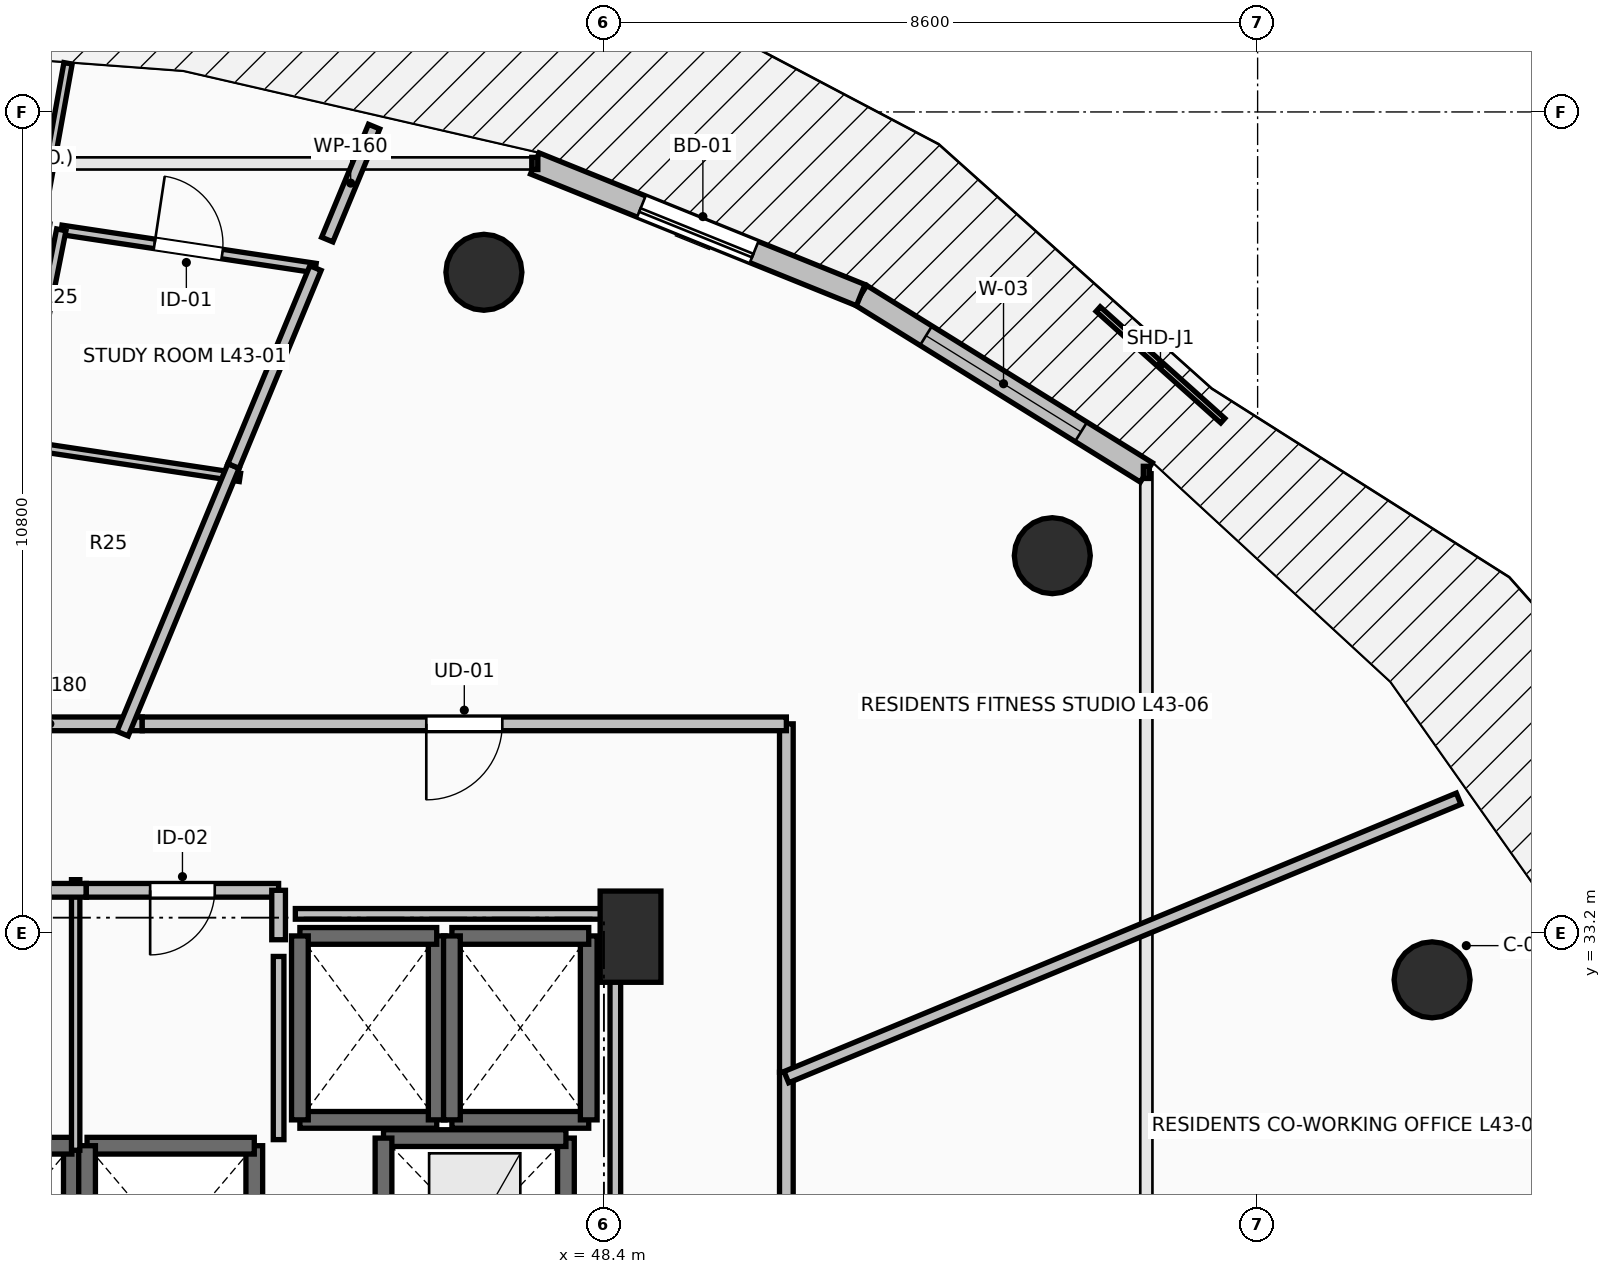
"""IFC4 building model, lengths in metres.
Left out: names, types, materials, properties, quantities, classifications, styles, units other than length and angle.
Written with IfcOpenShell. Run it as: python <this file> out.ifc"""

import sys

from ifc_helpers import new_model, si_unit, direction, frame, frame_2d, origin, origin_2d, place, context, subcontext, project, spatial, rectangle, circle, extrude, element, fill, save


model = new_model("IFC4")
c1 = context("Model", 3, precision=1e-05, world=origin(), true_north=direction((0.0, 1.0)))
c2 = subcontext(c1, "Body", "Model", "MODEL_VIEW")
j1 = project(units=[si_unit("LENGTHUNIT", "METRE"), si_unit("PLANEANGLEUNIT", "RADIAN")], contexts=[c1])
p1 = place(None, origin())
s1 = spatial("IfcSite", under=j1, at=p1, CompositionType="ELEMENT")
p2 = place(p1, origin())
s2 = spatial("IfcBuilding", under=s1, at=p2, CompositionType="ELEMENT")
p3 = place(p2, frame((0.0, 0.0, 160.6)))
s3 = spatial("IfcBuildingStorey", under=s2, at=p3, CompositionType="ELEMENT", Elevation=160.6)
for number, where, z_axis, x_axis in (
    (1, (59.295, 32.582, 0.0), (0.0, 0.0, 1.0), (0.924, 0.383, 0.0)),
    (2, (54.299, 38.162, 0.0), (0.0, 0.0, 1.0), (0.707, 0.707, 0.0)),
    (3, (46.821, 41.891, 0.0), (0.0, 0.0, 1.0), (0.383, 0.924, 0.0)),
):
    element("IfcColumn", number, at=place(p3, frame(where, z_axis=z_axis, x_axis=x_axis)), inside=s3, PredefinedType="COLUMN", context=c2, shape_type="SweptSolid", body=[
        extrude(circle(Radius=0.5, at=origin_2d()), origin(), (0.0, 0.0, 1.0), 3.5),
    ])
p4 = place(p3, frame((48.75, 33.15, 0.0), z_axis=(0.0, 0.0, 1.0), x_axis=(1.0, 0.0, 0.0)))
e4 = element("IfcColumn", 4, at=p4, inside=s3, PredefinedType="PILASTER", context=c2, shape_type="SweptSolid", body=[
    extrude(rectangle(XDim=0.8, YDim=1.2, at=origin_2d()), origin(), (0.0, 0.0, 1.0), 3.5),
])
p5 = place(p3, frame((55.536, 39.258, 0.0), z_axis=(0.0, 0.0, 1.0), x_axis=(-0.849721181976, 0.527232313977, 0.0)))
e5 = element("IfcWall", 5, at=p5, inside=s3, PredefinedType="STANDARD", context=c2, shape_type="SweptSolid", body=[
    extrude(rectangle(XDim=4.423, YDim=0.3, at=frame_2d((2.211, 0.0))), origin(), (0.0, 0.0, 1.0), 3.24),
])
p6 = place(p5, frame((1.011, 0.0, 0.85)))
e6 = element("IfcOpeningElement", 6, at=p6, cuts=e5, PredefinedType="OPENING", context=c2, shape_type="SweptSolid", body=[
    extrude(rectangle(XDim=2.4, YDim=2.19, at=frame_2d((1.2, 1.095))), frame((0.0, 0.165, 0.0), z_axis=(0.0, -1.0, 0.0), x_axis=(1.0, 0.0, 0.0)), (0.0, 0.0, 1.0), 0.33),
])
p7 = place(p3, frame((51.778, 41.59, 0.0), z_axis=(0.0, 0.0, 1.0), x_axis=(-0.927156504392, 0.374674280359, 0.0)))
e7 = element("IfcWall", 7, at=p7, inside=s3, PredefinedType="STANDARD", context=c2, shape_type="SweptSolid", body=[
    extrude(rectangle(XDim=4.625, YDim=0.3, at=frame_2d((2.312, 0.0))), origin(), (0.0, 0.0, 1.0), 3.24),
])
p8 = place(p7, frame((1.512, 0.0, 0.0)))
e8 = element("IfcOpeningElement", 8, at=p8, cuts=e7, PredefinedType="OPENING", context=c2, shape_type="SweptSolid", body=[
    extrude(rectangle(XDim=1.6, YDim=2.3, at=frame_2d((0.8, 1.15))), frame((0.0, 0.165, 0.0), z_axis=(0.0, -1.0, 0.0), x_axis=(1.0, 0.0, 0.0)), (0.0, 0.0, 1.0), 0.33),
])
p9 = place(p3, frame((41.4, 27.8, 0.0), z_axis=(0.0, 0.0, 1.0), x_axis=(0.0, 1.0, 0.0)))
e9 = element("IfcWall", 9, at=p9, inside=s3, PredefinedType="SOLIDWALL", context=c2, shape_type="SweptSolid", body=[
    extrude(rectangle(XDim=2.6, YDim=0.22, at=frame_2d((1.3, 0.0))), origin(), (0.0, 0.0, 1.0), 3.24),
])
p10 = place(p3, frame((41.4, 30.4, 0.0), z_axis=(0.0, 0.0, 1.0), x_axis=(-1.0, 0.0, 0.0)))
e10 = element("IfcWall", 10, at=p10, inside=s3, PredefinedType="SOLIDWALL", context=c2, shape_type="SweptSolid", body=[
    extrude(rectangle(XDim=2.2, YDim=0.22, at=frame_2d((1.1, 0.0))), origin(), (0.0, 0.0, 1.0), 3.24),
])
p11 = place(p3, frame((43.8, 27.8, 0.0), z_axis=(0.0, 0.0, 1.0), x_axis=(0.0, 1.0, 0.0)))
e11 = element("IfcWall", 11, at=p11, inside=s3, PredefinedType="SOLIDWALL", context=c2, shape_type="SweptSolid", body=[
    extrude(rectangle(XDim=2.6, YDim=0.22, at=frame_2d((1.3, 0.0))), origin(), (0.0, 0.0, 1.0), 3.24),
])
p12 = place(p3, frame((43.8, 30.4, 0.0), z_axis=(0.0, 0.0, 1.0), x_axis=(-1.0, 0.0, 0.0)))
e12 = element("IfcWall", 12, at=p12, inside=s3, PredefinedType="SOLIDWALL", context=c2, shape_type="SweptSolid", body=[
    extrude(rectangle(XDim=2.2, YDim=0.22, at=frame_2d((1.1, 0.0))), origin(), (0.0, 0.0, 1.0), 3.24),
])
p13 = place(p3, frame((41.6, 30.4, 0.0), z_axis=(0.0, 0.0, 1.0), x_axis=(0.0, -1.0, 0.0)))
e13 = element("IfcWall", 13, at=p13, inside=s3, PredefinedType="SOLIDWALL", context=c2, shape_type="SweptSolid", body=[
    extrude(rectangle(XDim=2.6, YDim=0.22, at=frame_2d((1.3, 0.0))), origin(), (0.0, 0.0, 1.0), 3.24),
])
p14 = place(p3, frame((44.4, 30.74, 0.0), z_axis=(0.0, 0.0, 1.0), x_axis=(1.0, 0.0, 0.0)))
e14 = element("IfcWall", 14, at=p14, inside=s3, PredefinedType="SOLIDWALL", context=c2, shape_type="SweptSolid", body=[
    extrude(rectangle(XDim=1.8, YDim=0.22, at=frame_2d((0.9, 0.0))), origin(), (0.0, 0.0, 1.0), 3.24),
])
p15 = place(p3, frame((46.2, 30.74, 0.0), z_axis=(0.0, 0.0, 1.0), x_axis=(0.0, 1.0, 0.0)))
e15 = element("IfcWall", 15, at=p15, inside=s3, PredefinedType="SOLIDWALL", context=c2, shape_type="SweptSolid", body=[
    extrude(rectangle(XDim=2.42, YDim=0.22, at=frame_2d((1.21, 0.0))), origin(), (0.0, 0.0, 1.0), 3.24),
])
p16 = place(p3, frame((46.2, 33.16, 0.0), z_axis=(0.0, 0.0, 1.0), x_axis=(-1.0, 0.0, 0.0)))
e16 = element("IfcWall", 16, at=p16, inside=s3, PredefinedType="SOLIDWALL", context=c2, shape_type="SweptSolid", body=[
    extrude(rectangle(XDim=1.8, YDim=0.22, at=frame_2d((0.9, 0.0))), origin(), (0.0, 0.0, 1.0), 3.24),
])
p17 = place(p3, frame((44.4, 33.16, 0.0), z_axis=(0.0, 0.0, 1.0), x_axis=(0.0, -1.0, 0.0)))
e17 = element("IfcWall", 17, at=p17, inside=s3, PredefinedType="SOLIDWALL", context=c2, shape_type="SweptSolid", body=[
    extrude(rectangle(XDim=2.42, YDim=0.22, at=frame_2d((1.21, 0.0))), origin(), (0.0, 0.0, 1.0), 3.24),
])
p18 = place(p3, frame((46.4, 30.74, 0.0), z_axis=(0.0, 0.0, 1.0), x_axis=(1.0, 0.0, 0.0)))
e18 = element("IfcWall", 18, at=p18, inside=s3, PredefinedType="SOLIDWALL", context=c2, shape_type="SweptSolid", body=[
    extrude(rectangle(XDim=1.8, YDim=0.22, at=frame_2d((0.9, 0.0))), origin(), (0.0, 0.0, 1.0), 3.24),
])
p19 = place(p3, frame((48.2, 30.74, 0.0), z_axis=(0.0, 0.0, 1.0), x_axis=(0.0, 1.0, 0.0)))
e19 = element("IfcWall", 19, at=p19, inside=s3, PredefinedType="SOLIDWALL", context=c2, shape_type="SweptSolid", body=[
    extrude(rectangle(XDim=2.42, YDim=0.22, at=frame_2d((1.21, 0.0))), origin(), (0.0, 0.0, 1.0), 3.24),
])
p20 = place(p3, frame((48.2, 33.16, 0.0), z_axis=(0.0, 0.0, 1.0), x_axis=(-1.0, 0.0, 0.0)))
e20 = element("IfcWall", 20, at=p20, inside=s3, PredefinedType="SOLIDWALL", context=c2, shape_type="SweptSolid", body=[
    extrude(rectangle(XDim=1.8, YDim=0.22, at=frame_2d((0.9, 0.0))), origin(), (0.0, 0.0, 1.0), 3.24),
])
p21 = place(p3, frame((46.4, 33.16, 0.0), z_axis=(0.0, 0.0, 1.0), x_axis=(0.0, -1.0, 0.0)))
e21 = element("IfcWall", 21, at=p21, inside=s3, PredefinedType="SOLIDWALL", context=c2, shape_type="SweptSolid", body=[
    extrude(rectangle(XDim=2.42, YDim=0.22, at=frame_2d((1.21, 0.0))), origin(), (0.0, 0.0, 1.0), 3.24),
])
p22 = place(p3, frame((47.9, 28.0, 0.0), z_axis=(0.0, 0.0, 1.0), x_axis=(0.0, 1.0, 0.0)))
e22 = element("IfcWall", 22, at=p22, inside=s3, PredefinedType="SHEAR", context=c2, shape_type="SweptSolid", body=[
    extrude(rectangle(XDim=2.5, YDim=0.22, at=frame_2d((1.25, 0.0))), origin(), (0.0, 0.0, 1.0), 3.24),
])
p23 = place(p3, frame((47.9, 30.5, 0.0), z_axis=(0.0, 0.0, 1.0), x_axis=(-1.0, 0.0, 0.0)))
e23 = element("IfcWall", 23, at=p23, inside=s3, PredefinedType="SHEAR", context=c2, shape_type="SweptSolid", body=[
    extrude(rectangle(XDim=2.4, YDim=0.22, at=frame_2d((1.2, 0.0))), origin(), (0.0, 0.0, 1.0), 3.24),
])
p24 = place(p3, frame((45.5, 30.5, 0.0), z_axis=(0.0, 0.0, 1.0), x_axis=(0.0, -1.0, 0.0)))
e24 = element("IfcWall", 24, at=p24, inside=s3, PredefinedType="SHEAR", context=c2, shape_type="SweptSolid", body=[
    extrude(rectangle(XDim=2.5, YDim=0.22, at=frame_2d((1.25, 0.0))), origin(), (0.0, 0.0, 1.0), 3.24),
])
p25 = place(p3, frame((41.45, 30.34, 0.0), z_axis=(0.0, 0.0, 1.0), x_axis=(0.0, 1.0, 0.0)))
e25 = element("IfcWall", 25, at=p25, inside=s3, PredefinedType="PARTITIONING", context=c2, shape_type="SweptSolid", body=[
    extrude(rectangle(XDim=3.56, YDim=0.11, at=frame_2d((1.78, 0.0))), origin(), (0.0, 0.0, 1.0), 3.24),
])
p26 = place(p3, frame((41.59, 33.76, 0.0), z_axis=(0.0, 0.0, 1.0), x_axis=(-1.0, 0.0, 0.0)))
e26 = element("IfcWall", 26, at=p26, inside=s3, PredefinedType="PARTITIONING", context=c2, shape_type="SweptSolid", body=[
    extrude(rectangle(XDim=3.44, YDim=0.18, at=frame_2d((1.72, 0.0))), origin(), (0.0, 0.0, 1.0), 3.24),
])
p27 = place(p26, frame((1.295, 0.0, 0.0)))
e27 = element("IfcOpeningElement", 27, at=p27, cuts=e26, PredefinedType="OPENING", context=c2, shape_type="SweptSolid", body=[
    extrude(rectangle(XDim=0.85, YDim=2.1, at=frame_2d((0.425, 1.05))), frame((0.0, 0.105, 0.0), z_axis=(0.0, -1.0, 0.0), x_axis=(1.0, 0.0, 0.0)), (0.0, 0.0, 1.0), 0.21),
])
p28 = place(p3, frame((44.12, 33.76, 0.0), z_axis=(0.0, 0.0, 1.0), x_axis=(-1.0, 0.0, 0.0)))
e28 = element("IfcWall", 28, at=p28, inside=s3, PredefinedType="PARTITIONING", context=c2, shape_type="SweptSolid", body=[
    extrude(rectangle(XDim=2.53, YDim=0.18, at=frame_2d((1.265, 0.0))), origin(), (0.0, 0.0, 1.0), 3.24),
])
p29 = place(p28, frame((0.84, 0.0, 0.0)))
e29 = element("IfcOpeningElement", 29, at=p29, cuts=e28, PredefinedType="OPENING", context=c2, shape_type="SweptSolid", body=[
    extrude(rectangle(XDim=0.85, YDim=2.1, at=frame_2d((0.425, 1.05))), frame((0.0, 0.105, 0.0), z_axis=(0.0, -1.0, 0.0), x_axis=(1.0, 0.0, 0.0)), (0.0, 0.0, 1.0), 0.21),
])
p30 = place(p3, frame((44.12, 33.11, 0.0), z_axis=(0.0, 0.0, 1.0), x_axis=(0.0, 1.0, 0.0)))
e30 = element("IfcWall", 30, at=p30, inside=s3, PredefinedType="PARTITIONING", context=c2, shape_type="SweptSolid", body=[
    extrude(rectangle(XDim=0.65, YDim=0.18, at=frame_2d((0.325, 0.0))), origin(), (0.0, 0.0, 1.0), 3.24),
])
p31 = place(p3, frame((42.326, 35.95, 0.0), z_axis=(0.0, 0.0, 1.0), x_axis=(-1.0, 0.0, 0.0)))
e31 = element("IfcWall", 31, at=p31, inside=s3, PredefinedType="PARTITIONING", context=c2, shape_type="SweptSolid", body=[
    extrude(rectangle(XDim=2.432, YDim=0.18, at=frame_2d((1.216, 0.0))), origin(), (0.0, 0.0, 1.0), 3.24),
])
p32 = place(p3, frame((50.8, 27.25, 0.0), z_axis=(0.0, 0.0, 1.0), x_axis=(0.0, 1.0, 0.0)))
e32 = element("IfcWall", 32, at=p32, inside=s3, PredefinedType="PARTITIONING", context=c2, shape_type="SweptSolid", body=[
    extrude(rectangle(XDim=4.117, YDim=0.18, at=frame_2d((2.059, 0.0))), origin(), (0.0, 0.0, 1.0), 2.432),
])
p33 = place(p3, frame((50.8, 31.367, 0.0), z_axis=(0.0, 0.0, 1.0), x_axis=(0.0, 1.0, 0.0)))
e33 = element("IfcWall", 33, at=p33, inside=s3, PredefinedType="PARTITIONING", context=c2, shape_type="SweptSolid", body=[
    extrude(rectangle(XDim=4.583, YDim=0.18, at=frame_2d((2.292, 0.0))), origin(), (0.0, 0.0, 1.0), 2.432),
])
p34 = place(p3, frame((50.8, 35.95, 0.0), z_axis=(0.0, 0.0, 1.0), x_axis=(-1.0, 0.0, 0.0)))
e34 = element("IfcWall", 34, at=p34, inside=s3, PredefinedType="PARTITIONING", context=c2, shape_type="SweptSolid", body=[
    extrude(rectangle(XDim=8.474, YDim=0.18, at=frame_2d((4.237, 0.0))), origin(), (0.0, 0.0, 1.0), 2.432),
])
p35 = place(p34, frame((3.737, 0.0, 0.0)))
e35 = element("IfcOpeningElement", 35, at=p35, cuts=e34, PredefinedType="OPENING", context=c2, shape_type="SweptSolid", body=[
    extrude(rectangle(XDim=1.0, YDim=2.15, at=frame_2d((0.5, 1.075))), frame((0.0, 0.105, 0.0), z_axis=(0.0, -1.0, 0.0), x_axis=(1.0, 0.0, 0.0)), (0.0, 0.0, 1.0), 0.21),
])
p36 = place(p3, frame((41.35, 44.64, 0.0), z_axis=(0.0, 0.0, 1.0), x_axis=(-0.176977699102, -0.984214861715, 0.0)))
e36 = element("IfcWall", 36, at=p36, inside=s3, PredefinedType="PARTITIONING", context=c2, shape_type="SweptSolid", body=[
    extrude(rectangle(XDim=2.32, YDim=0.11, at=frame_2d((1.16, 0.0))), origin(), (0.0, 0.0, 1.0), 2.728),
])
p37 = place(p3, frame((41.261, 42.449, 0.0), z_axis=(0.0, 0.0, 1.0), x_axis=(0.988878555922, -0.148725255545, 0.0)))
e37 = element("IfcWall", 37, at=p37, inside=s3, PredefinedType="PARTITIONING", context=c2, shape_type="SweptSolid", body=[
    extrude(rectangle(XDim=3.382, YDim=0.125, at=frame_2d((1.691, 0.0))), origin(), (0.0, 0.0, 1.0), 3.24),
])
p38 = place(p37, frame((1.241, 0.0, 0.0)))
e38 = element("IfcOpeningElement", 38, at=p38, cuts=e37, PredefinedType="OPENING", context=c2, shape_type="SweptSolid", body=[
    extrude(rectangle(XDim=0.9, YDim=2.1, at=frame_2d((0.45, 1.05))), frame((0.0, 0.077, 0.0), z_axis=(0.0, -1.0, 0.0), x_axis=(1.0, 0.0, 0.0)), (0.0, 0.0, 1.0), 0.155),
])
p39 = place(p3, frame((40.729, 39.767, 0.0), z_axis=(0.0, 0.0, 1.0), x_axis=(0.194501549107, 0.980902210924, 0.0)))
e39 = element("IfcWall", 39, at=p39, inside=s3, PredefinedType="PARTITIONING", context=c2, shape_type="SweptSolid", body=[
    extrude(rectangle(XDim=2.734, YDim=0.125, at=frame_2d((1.367, 0.0))), origin(), (0.0, 0.0, 1.0), 2.886),
])
p40 = place(p3, frame((44.76, 42.321, 0.0), z_axis=(0.0, 0.0, 1.0), x_axis=(0.382955001099, 0.923766998292, 0.0)))
e40 = element("IfcWall", 40, at=p40, inside=s3, PredefinedType="PARTITIONING", context=c2, shape_type="SweptSolid", body=[
    extrude(rectangle(XDim=1.608, YDim=0.16, at=frame_2d((0.804, 0.0))), origin(), (0.0, 0.0, 1.0), 2.728),
])
p41 = place(p3, frame((43.611, 39.192, 0.0), z_axis=(0.0, 0.0, 1.0), x_axis=(-0.988860105068, 0.148847884116, 0.0)))
e41 = element("IfcWall", 41, at=p41, inside=s3, PredefinedType="PARTITIONING", context=c2, shape_type="SweptSolid", body=[
    extrude(rectangle(XDim=3.082, YDim=0.11, at=frame_2d((1.541, 0.0))), origin(), (0.0, 0.0, 1.0), 2.886),
])
p42 = place(p3, frame((42.067, 35.821, 0.0), z_axis=(0.0, 0.0, 1.0), x_axis=(0.382813734438, 0.92382554886, 0.0)))
e42 = element("IfcWall", 42, at=p42, inside=s3, PredefinedType="PARTITIONING", context=c2, shape_type="SweptSolid", body=[
    extrude(rectangle(XDim=3.812, YDim=0.16, at=frame_2d((1.906, 0.0))), origin(), (0.0, 0.0, 1.0), 2.886),
])
p43 = place(p3, frame((43.527, 39.342, 0.0), z_axis=(0.0, 0.0, 1.0), x_axis=(0.38263998022, 0.923897529782, 0.0)))
e43 = element("IfcWall", 43, at=p43, inside=s3, PredefinedType="PARTITIONING", context=c2, shape_type="SweptSolid", body=[
    extrude(rectangle(XDim=2.818, YDim=0.16, at=frame_2d((1.409, 0.0))), origin(), (0.0, 0.0, 1.0), 2.886),
])
p44 = place(p3, frame((59.645, 34.965, 0.0), z_axis=(0.0, 0.0, 1.0), x_axis=(-0.923902460479, -0.382628074665, 0.0)))
e44 = element("IfcWall", 44, at=p44, inside=s3, PredefinedType="PARTITIONING", context=c2, shape_type="SweptSolid", body=[
    extrude(rectangle(XDim=9.573, YDim=0.16, at=frame_2d((4.787, 0.0))), origin(), (0.0, 0.0, 1.0), 2.432),
])
p45 = place(p3, frame((44.12, 30.48, 0.0), z_axis=(0.0, 0.0, 1.0), x_axis=(0.0, 1.0, 0.0)))
e45 = element("IfcWall", 45, at=p45, inside=s3, PredefinedType="PARTITIONING", context=c2, shape_type="SweptSolid", body=[
    extrude(rectangle(XDim=2.41, YDim=0.14, at=frame_2d((1.205, 0.0))), origin(), (0.0, 0.0, 1.0), 3.24),
])
p46 = place(p3, frame((48.55, 28.196, 0.0), z_axis=(0.0, 0.0, 1.0), x_axis=(0.0, 1.0, 0.0)))
e46 = element("IfcWall", 46, at=p46, inside=s3, PredefinedType="PARTITIONING", context=c2, shape_type="SweptSolid", body=[
    extrude(rectangle(XDim=5.254, YDim=0.14, at=frame_2d((2.627, 0.0))), origin(), (0.0, 0.0, 1.0), 2.432),
])
p47 = place(p3, frame((48.55, 33.45, 0.0), z_axis=(0.0, 0.0, 1.0), x_axis=(-1.0, 0.0, 0.0)))
e47 = element("IfcWall", 47, at=p47, inside=s3, PredefinedType="PARTITIONING", context=c2, shape_type="SweptSolid", body=[
    extrude(rectangle(XDim=4.21, YDim=0.14, at=frame_2d((2.105, 0.0))), origin(), (0.0, 0.0, 1.0), 2.432),
])
p48 = place(p8, origin())
e48 = element("IfcDoor", 48, at=p48, inside=s3, OperationType="SLIDING_TO_LEFT", PredefinedType="DOOR", context=c2, shape_type="SweptSolid", body=[
    extrude(rectangle(XDim=1.6, YDim=2.3, at=frame_2d((0.8, 1.15))), frame((0.0, 0.025, 0.0), z_axis=(0.0, -1.0, 0.0), x_axis=(1.0, 0.0, 0.0)), (0.0, 0.0, 1.0), 0.05),
])
fill(e8, e48)
p49 = place(p6, origin())
e49 = element("IfcWindow", 49, at=p49, inside=s3, PartitioningType="SINGLE_PANEL", PredefinedType="WINDOW", context=c2, shape_type="SweptSolid", body=[
    extrude(rectangle(XDim=2.4, YDim=2.19, at=frame_2d((1.2, 1.095))), frame((0.0, 0.03, 0.0), z_axis=(0.0, -1.0, 0.0), x_axis=(1.0, 0.0, 0.0)), (0.0, 0.0, 1.0), 0.06),
])
fill(e6, e49)
p50 = place(p29, origin())
e50 = element("IfcDoor", 50, at=p50, inside=s3, OperationType="SINGLE_SWING_RIGHT", PredefinedType="DOOR", context=c2, shape_type="SweptSolid", body=[
    extrude(rectangle(XDim=0.85, YDim=2.1, at=frame_2d((0.425, 1.05))), frame((0.0, 0.025, 0.0), z_axis=(0.0, -1.0, 0.0), x_axis=(1.0, 0.0, 0.0)), (0.0, 0.0, 1.0), 0.05),
])
fill(e29, e50)
p51 = place(p35, origin())
e51 = element("IfcDoor", 51, at=p51, inside=s3, OperationType="SINGLE_SWING_RIGHT", PredefinedType="DOOR", context=c2, shape_type="SweptSolid", body=[
    extrude(rectangle(XDim=1.0, YDim=2.15, at=frame_2d((0.5, 1.075))), frame((0.0, 0.025, 0.0), z_axis=(0.0, -1.0, 0.0), x_axis=(1.0, 0.0, 0.0)), (0.0, 0.0, 1.0), 0.05),
])
fill(e35, e51)
p52 = place(p38, origin())
e52 = element("IfcDoor", 52, at=p52, inside=s3, OperationType="SINGLE_SWING_LEFT", PredefinedType="DOOR", context=c2, shape_type="SweptSolid", body=[
    extrude(rectangle(XDim=0.9, YDim=2.1, at=frame_2d((0.45, 1.05))), frame((0.0, 0.025, 0.0), z_axis=(0.0, -1.0, 0.0), x_axis=(1.0, 0.0, 0.0)), (0.0, 0.0, 1.0), 0.05),
])
fill(e38, e52)
save(model, sys.argv[1])
